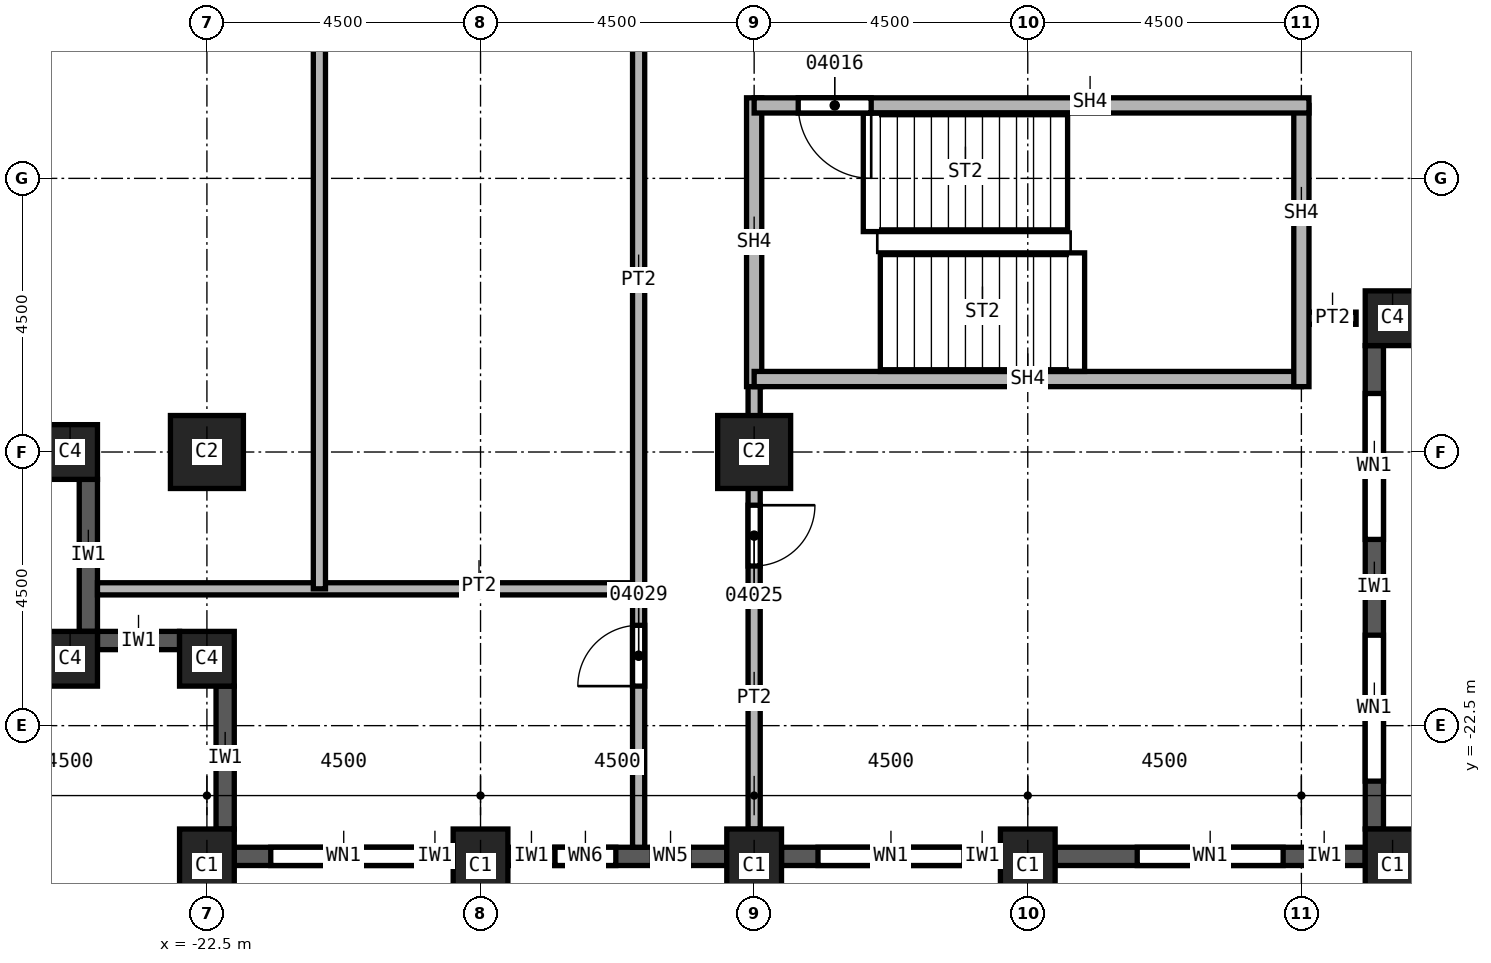
"""IFC4 building model, lengths in metres.
Left out: names, types, materials, properties, quantities, classifications, styles, units other than length and angle.
Written with IfcOpenShell. Run it as: python <this file> out.ifc"""

import sys

from ifc_helpers import new_model, si_unit, direction, frame, frame_2d, origin, origin_2d, place, context, subcontext, project, spatial, rectangle, extrude, element, fill, save


model = new_model("IFC4")
c1 = context("Model", 3, precision=1e-05, world=origin(), true_north=direction((0.0, 1.0)))
c2 = subcontext(c1, "Body", "Model", "MODEL_VIEW")
j1 = project(units=[si_unit("LENGTHUNIT", "METRE"), si_unit("PLANEANGLEUNIT", "RADIAN")], contexts=[c1])
p1 = place(None, origin())
s1 = spatial("IfcSite", under=j1, at=p1, CompositionType="ELEMENT")
p2 = place(p1, origin())
s2 = spatial("IfcBuilding", under=s1, at=p2, CompositionType="ELEMENT")
p3 = place(p2, frame((0.0, 0.0, 108.0)))
s3 = spatial("IfcBuildingStorey", under=s2, at=p3, CompositionType="ELEMENT", Elevation=108.0)
for number, where, z_axis, x_axis in (
    (1, (-13.5, -18.0, 0.0), (0.0, 0.0, 1.0), (1.0, 0.0, 0.0)),
    (2, (-22.5, -18.0, 0.0), (0.0, 0.0, 1.0), (1.0, 0.0, 0.0)),
):
    element("IfcColumn", number, at=place(p3, frame(where, z_axis=z_axis, x_axis=x_axis)), inside=s3, PredefinedType="COLUMN", context=c2, shape_type="SweptSolid", body=[
        extrude(rectangle(XDim=1.2, YDim=1.2, at=origin_2d()), origin(), (0.0, 0.0, 1.0), 3.7),
    ])
for number, where, z_axis, x_axis in (
    (3, (-3.0, -24.8, 0.0), (0.0, 0.0, 1.0), (1.0, 0.0, 0.0)),
    (4, (-9.0, -24.8, 0.0), (0.0, 0.0, 1.0), (1.0, 0.0, 0.0)),
    (5, (-13.5, -24.8, 0.0), (0.0, 0.0, 1.0), (1.0, 0.0, 0.0)),
    (6, (-18.0, -24.8, 0.0), (0.0, 0.0, 1.0), (1.0, 0.0, 0.0)),
    (7, (-22.5, -24.8, 0.0), (0.0, 0.0, 1.0), (1.0, 0.0, 0.0)),
):
    element("IfcColumn", number, at=place(p3, frame(where, z_axis=z_axis, x_axis=x_axis)), inside=s3, PredefinedType="COLUMN", context=c2, shape_type="SweptSolid", body=[
        extrude(rectangle(XDim=0.9, YDim=1.2, at=origin_2d()), origin(), (0.0, 0.0, 1.0), 3.7),
    ])
for number, where, z_axis, x_axis in (
    (8, (-3.0, -15.8, 0.0), (0.0, 0.0, 1.0), (1.0, 0.0, 0.0)),
    (9, (-22.5, -21.4, 0.0), (0.0, 0.0, 1.0), (1.0, 0.0, 0.0)),
    (10, (-24.75, -21.4, 0.0), (0.0, 0.0, 1.0), (1.0, 0.0, 0.0)),
    (11, (-24.75, -18.0, 0.0), (0.0, 0.0, 1.0), (1.0, 0.0, 0.0)),
):
    element("IfcColumn", number, at=place(p3, frame(where, z_axis=z_axis, x_axis=x_axis)), inside=s3, PredefinedType="COLUMN", context=c2, shape_type="SweptSolid", body=[
        extrude(rectangle(XDim=0.9, YDim=0.9, at=origin_2d()), origin(), (0.0, 0.0, 1.0), 3.7),
    ])
p4 = place(p3, frame((-24.45, -18.45, 0.0), z_axis=(0.0, 0.0, 1.0), x_axis=(0.0, -1.0, 0.0)))
e12 = element("IfcWall", 12, at=p4, inside=s3, PredefinedType="SOLIDWALL", context=c2, shape_type="SweptSolid", body=[
    extrude(rectangle(XDim=2.5, YDim=0.3, at=frame_2d((1.25, 0.0))), origin(), (0.0, 0.0, 1.0), 3.1),
])
p5 = place(p3, frame((-24.3, -21.1, 0.0), z_axis=(0.0, 0.0, 1.0), x_axis=(1.0, 0.0, 0.0)))
e13 = element("IfcWall", 13, at=p5, inside=s3, PredefinedType="SOLIDWALL", context=c2, shape_type="SweptSolid", body=[
    extrude(rectangle(XDim=1.35, YDim=0.3, at=frame_2d((0.675, 0.0))), origin(), (0.0, 0.0, 1.0), 3.1),
])
p6 = place(p3, frame((-22.2, -21.85, 0.0), z_axis=(0.0, 0.0, 1.0), x_axis=(0.0, -1.0, 0.0)))
e14 = element("IfcWall", 14, at=p6, inside=s3, PredefinedType="SOLIDWALL", context=c2, shape_type="SweptSolid", body=[
    extrude(rectangle(XDim=2.35, YDim=0.3, at=frame_2d((1.175, 0.0))), origin(), (0.0, 0.0, 1.0), 3.1),
])
p7 = place(p3, frame((-22.05, -24.65, 0.0), z_axis=(0.0, 0.0, 1.0), x_axis=(1.0, 0.0, 0.0)))
e15 = element("IfcWall", 15, at=p7, inside=s3, PredefinedType="SOLIDWALL", context=c2, shape_type="SweptSolid", body=[
    extrude(rectangle(XDim=3.6, YDim=0.3, at=frame_2d((1.8, 0.0))), origin(), (0.0, 0.0, 1.0), 3.1),
])
p8 = place(p7, frame((0.6, 0.0, 0.8)))
e16 = element("IfcOpeningElement", 16, at=p8, cuts=e15, PredefinedType="OPENING", context=c2, shape_type="SweptSolid", body=[
    extrude(rectangle(XDim=2.4, YDim=1.95, at=frame_2d((1.2, 0.975))), frame((0.0, 0.15, 0.0), z_axis=(0.0, -1.0, 0.0), x_axis=(1.0, 0.0, 0.0)), (0.0, 0.0, 1.0), 0.3),
])
p9 = place(p3, frame((-17.55, -24.65, 0.0), z_axis=(0.0, 0.0, 1.0), x_axis=(1.0, 0.0, 0.0)))
e17 = element("IfcWall", 17, at=p9, inside=s3, PredefinedType="SOLIDWALL", context=c2, shape_type="SweptSolid", body=[
    extrude(rectangle(XDim=3.6, YDim=0.3, at=frame_2d((1.8, 0.0))), origin(), (0.0, 0.0, 1.0), 3.1),
])
p10 = place(p9, frame((0.775, 0.0, 0.8)))
e18 = element("IfcOpeningElement", 18, at=p10, cuts=e17, PredefinedType="OPENING", context=c2, shape_type="SweptSolid", body=[
    extrude(rectangle(XDim=1.0, YDim=1.95, at=frame_2d((0.5, 0.975))), frame((0.0, 0.15, 0.0), z_axis=(0.0, -1.0, 0.0), x_axis=(1.0, 0.0, 0.0)), (0.0, 0.0, 1.0), 0.3),
])
p11 = place(p9, frame((2.375, 0.0, 0.8)))
e19 = element("IfcOpeningElement", 19, at=p11, cuts=e17, PredefinedType="OPENING", context=c2, shape_type="SweptSolid", body=[
    extrude(rectangle(XDim=0.6, YDim=1.95, at=frame_2d((0.3, 0.975))), frame((0.0, 0.15, 0.0), z_axis=(0.0, -1.0, 0.0), x_axis=(1.0, 0.0, 0.0)), (0.0, 0.0, 1.0), 0.3),
])
p12 = place(p3, frame((-13.05, -24.65, 0.0), z_axis=(0.0, 0.0, 1.0), x_axis=(1.0, 0.0, 0.0)))
e20 = element("IfcWall", 20, at=p12, inside=s3, PredefinedType="SOLIDWALL", context=c2, shape_type="SweptSolid", body=[
    extrude(rectangle(XDim=3.6, YDim=0.3, at=frame_2d((1.8, 0.0))), origin(), (0.0, 0.0, 1.0), 3.1),
])
p13 = place(p12, frame((0.6, 0.0, 0.8)))
e21 = element("IfcOpeningElement", 21, at=p13, cuts=e20, PredefinedType="OPENING", context=c2, shape_type="SweptSolid", body=[
    extrude(rectangle(XDim=2.4, YDim=1.95, at=frame_2d((1.2, 0.975))), frame((0.0, 0.15, 0.0), z_axis=(0.0, -1.0, 0.0), x_axis=(1.0, 0.0, 0.0)), (0.0, 0.0, 1.0), 0.3),
])
p14 = place(p3, frame((-8.55, -24.65, 0.0), z_axis=(0.0, 0.0, 1.0), x_axis=(1.0, 0.0, 0.0)))
e22 = element("IfcWall", 22, at=p14, inside=s3, PredefinedType="SOLIDWALL", context=c2, shape_type="SweptSolid", body=[
    extrude(rectangle(XDim=5.1, YDim=0.3, at=frame_2d((2.55, 0.0))), origin(), (0.0, 0.0, 1.0), 3.1),
])
p15 = place(p14, frame((1.35, 0.0, 0.8)))
e23 = element("IfcOpeningElement", 23, at=p15, cuts=e22, PredefinedType="OPENING", context=c2, shape_type="SweptSolid", body=[
    extrude(rectangle(XDim=2.4, YDim=1.95, at=frame_2d((1.2, 0.975))), frame((0.0, 0.15, 0.0), z_axis=(0.0, -1.0, 0.0), x_axis=(1.0, 0.0, 0.0)), (0.0, 0.0, 1.0), 0.3),
])
p16 = place(p3, frame((-3.3, -24.2, 0.0), z_axis=(0.0, 0.0, 1.0), x_axis=(0.0, 1.0, 0.0)))
e24 = element("IfcWall", 24, at=p16, inside=s3, PredefinedType="SOLIDWALL", context=c2, shape_type="SweptSolid", body=[
    extrude(rectangle(XDim=7.95, YDim=0.3, at=frame_2d((3.975, 0.0))), origin(), (0.0, 0.0, 1.0), 3.1),
])
p17 = place(p16, frame((0.788, 0.0, 0.8)))
e25 = element("IfcOpeningElement", 25, at=p17, cuts=e24, PredefinedType="OPENING", context=c2, shape_type="SweptSolid", body=[
    extrude(rectangle(XDim=2.4, YDim=1.95, at=frame_2d((1.2, 0.975))), frame((0.0, 0.15, 0.0), z_axis=(0.0, -1.0, 0.0), x_axis=(1.0, 0.0, 0.0)), (0.0, 0.0, 1.0), 0.3),
])
p18 = place(p16, frame((4.762, 0.0, 0.8)))
e26 = element("IfcOpeningElement", 26, at=p18, cuts=e24, PredefinedType="OPENING", context=c2, shape_type="SweptSolid", body=[
    extrude(rectangle(XDim=2.4, YDim=1.95, at=frame_2d((1.2, 0.975))), frame((0.0, 0.15, 0.0), z_axis=(0.0, -1.0, 0.0), x_axis=(1.0, 0.0, 0.0)), (0.0, 0.0, 1.0), 0.3),
])
p19 = place(p3, frame((-24.3, -20.25, 0.0), z_axis=(0.0, 0.0, 1.0), x_axis=(1.0, 0.0, 0.0)))
e27 = element("IfcWall", 27, at=p19, inside=s3, PredefinedType="PARTITIONING", context=c2, shape_type="SweptSolid", body=[
    extrude(rectangle(XDim=8.9, YDim=0.2, at=frame_2d((4.45, 0.0))), origin(), (0.0, 0.0, 1.0), 3.7),
])
p20 = place(p3, frame((-20.65, -20.25, 0.0), z_axis=(0.0, 0.0, 1.0), x_axis=(0.0, 1.0, 0.0)))
e28 = element("IfcWall", 28, at=p20, inside=s3, PredefinedType="PARTITIONING", context=c2, shape_type="SweptSolid", body=[
    extrude(rectangle(XDim=21.0, YDim=0.2, at=frame_2d((10.5, 0.0))), origin(), (0.0, 0.0, 1.0), 3.7),
])
p21 = place(p20, frame((9.1, 0.0, 0.0)))
e29 = element("IfcOpeningElement", 29, at=p21, cuts=e28, PredefinedType="OPENING", context=c2, shape_type="SweptSolid", body=[
    extrude(rectangle(XDim=1.0, YDim=2.1, at=frame_2d((0.5, 1.05))), frame((0.0, 0.1, 0.0), z_axis=(0.0, -1.0, 0.0), x_axis=(1.0, 0.0, 0.0)), (0.0, 0.0, 1.0), 0.2),
])
p22 = place(p3, frame((-15.4, -24.5, 0.0), z_axis=(0.0, 0.0, 1.0), x_axis=(0.0, 1.0, 0.0)))
e30 = element("IfcWall", 30, at=p22, inside=s3, PredefinedType="PARTITIONING", context=c2, shape_type="SweptSolid", body=[
    extrude(rectangle(XDim=25.35, YDim=0.2, at=frame_2d((12.675, 0.0))), origin(), (0.0, 0.0, 1.0), 3.7),
])
p23 = place(p22, frame((2.65, 0.0, 0.0)))
e31 = element("IfcOpeningElement", 31, at=p23, cuts=e30, PredefinedType="OPENING", context=c2, shape_type="SweptSolid", body=[
    extrude(rectangle(XDim=1.0, YDim=2.1, at=frame_2d((0.5, 1.05))), frame((0.0, 0.1, 0.0), z_axis=(0.0, -1.0, 0.0), x_axis=(1.0, 0.0, 0.0)), (0.0, 0.0, 1.0), 0.2),
])
p24 = place(p22, frame((14.3, 0.0, 0.0)))
e32 = element("IfcOpeningElement", 32, at=p24, cuts=e30, PredefinedType="OPENING", context=c2, shape_type="SweptSolid", body=[
    extrude(rectangle(XDim=1.0, YDim=2.1, at=frame_2d((0.5, 1.05))), frame((0.0, 0.1, 0.0), z_axis=(0.0, -1.0, 0.0), x_axis=(1.0, 0.0, 0.0)), (0.0, 0.0, 1.0), 0.2),
])
p25 = place(p3, frame((-13.5, -16.675, 0.0), z_axis=(0.0, 0.0, 1.0), x_axis=(0.0, -1.0, 0.0)))
e33 = element("IfcWall", 33, at=p25, inside=s3, PredefinedType="PARTITIONING", context=c2, shape_type="SweptSolid", body=[
    extrude(rectangle(XDim=7.525, YDim=0.2, at=frame_2d((3.762, 0.0))), origin(), (0.0, 0.0, 1.0), 3.7),
])
p26 = place(p25, frame((2.2, 0.0, 0.0)))
e34 = element("IfcOpeningElement", 34, at=p26, cuts=e33, PredefinedType="OPENING", context=c2, shape_type="SweptSolid", body=[
    extrude(rectangle(XDim=1.0, YDim=2.1, at=frame_2d((0.5, 1.05))), frame((0.0, 0.1, 0.0), z_axis=(0.0, -1.0, 0.0), x_axis=(1.0, 0.0, 0.0)), (0.0, 0.0, 1.0), 0.2),
])
p27 = place(p3, frame((-3.6, -15.8, 0.0), z_axis=(0.0, 0.0, 1.0), x_axis=(-1.0, 0.0, 0.0)))
e35 = element("IfcWall", 35, at=p27, inside=s3, PredefinedType="PARTITIONING", context=c2, shape_type="SweptSolid", body=[
    extrude(rectangle(XDim=0.9, YDim=0.2, at=frame_2d((0.45, 0.0))), origin(), (0.0, 0.0, 1.0), 3.7),
])
p28 = place(p3, frame((-13.5, -12.175, 0.0), z_axis=(0.0, 0.0, 1.0), x_axis=(0.0, -1.0, 0.0)))
e36 = element("IfcWall", 36, at=p28, inside=s3, PredefinedType="SOLIDWALL", context=c2, shape_type="SweptSolid", body=[
    extrude(rectangle(XDim=4.75, YDim=0.25, at=frame_2d((2.375, 0.0))), origin(), (0.0, 0.0, 1.0), 3.7),
])
p29 = place(p3, frame((-4.5, -16.8, 0.0), z_axis=(0.0, 0.0, 1.0), x_axis=(-1.0, 0.0, 0.0)))
e37 = element("IfcWall", 37, at=p29, inside=s3, PredefinedType="SOLIDWALL", context=c2, shape_type="SweptSolid", body=[
    extrude(rectangle(XDim=9.0, YDim=0.25, at=frame_2d((4.5, 0.0))), origin(), (0.0, 0.0, 1.0), 3.7),
])
p30 = place(p3, frame((-4.5, -12.3, 0.0), z_axis=(0.0, 0.0, 1.0), x_axis=(0.0, -1.0, 0.0)))
e38 = element("IfcWall", 38, at=p30, inside=s3, PredefinedType="SOLIDWALL", context=c2, shape_type="SweptSolid", body=[
    extrude(rectangle(XDim=4.625, YDim=0.25, at=frame_2d((2.312, 0.0))), origin(), (0.0, 0.0, 1.0), 3.7),
])
p31 = place(p3, frame((-4.375, -12.3, 0.0), z_axis=(0.0, 0.0, 1.0), x_axis=(-1.0, 0.0, 0.0)))
e39 = element("IfcWall", 39, at=p31, inside=s3, PredefinedType="SOLIDWALL", context=c2, shape_type="SweptSolid", body=[
    extrude(rectangle(XDim=9.125, YDim=0.25, at=frame_2d((4.562, 0.0))), origin(), (0.0, 0.0, 1.0), 3.7),
])
p32 = place(p31, frame((7.2, 0.0, 0.0)))
e40 = element("IfcOpeningElement", 40, at=p32, cuts=e39, PredefinedType="OPENING", context=c2, shape_type="SweptSolid", body=[
    extrude(rectangle(XDim=1.2, YDim=2.1, at=frame_2d((0.6, 1.05))), frame((0.0, 0.125, 0.0), z_axis=(0.0, -1.0, 0.0), x_axis=(1.0, 0.0, 0.0)), (0.0, 0.0, 1.0), 0.25),
])
p33 = place(p8, origin())
e41 = element("IfcWindow", 41, at=p33, inside=s3, PartitioningType="SINGLE_PANEL", PredefinedType="WINDOW", context=c2, shape_type="SweptSolid", body=[
    extrude(rectangle(XDim=2.4, YDim=1.95, at=frame_2d((1.2, 0.975))), frame((0.0, 0.03, 0.0), z_axis=(0.0, -1.0, 0.0), x_axis=(1.0, 0.0, 0.0)), (0.0, 0.0, 1.0), 0.06),
])
fill(e16, e41)
p34 = place(p13, origin())
e42 = element("IfcWindow", 42, at=p34, inside=s3, PartitioningType="SINGLE_PANEL", PredefinedType="WINDOW", context=c2, shape_type="SweptSolid", body=[
    extrude(rectangle(XDim=2.4, YDim=1.95, at=frame_2d((1.2, 0.975))), frame((0.0, 0.03, 0.0), z_axis=(0.0, -1.0, 0.0), x_axis=(1.0, 0.0, 0.0)), (0.0, 0.0, 1.0), 0.06),
])
fill(e21, e42)
p35 = place(p15, origin())
e43 = element("IfcWindow", 43, at=p35, inside=s3, PartitioningType="SINGLE_PANEL", PredefinedType="WINDOW", context=c2, shape_type="SweptSolid", body=[
    extrude(rectangle(XDim=2.4, YDim=1.95, at=frame_2d((1.2, 0.975))), frame((0.0, 0.03, 0.0), z_axis=(0.0, -1.0, 0.0), x_axis=(1.0, 0.0, 0.0)), (0.0, 0.0, 1.0), 0.06),
])
fill(e23, e43)
p36 = place(p17, origin())
e44 = element("IfcWindow", 44, at=p36, inside=s3, PartitioningType="SINGLE_PANEL", PredefinedType="WINDOW", context=c2, shape_type="SweptSolid", body=[
    extrude(rectangle(XDim=2.4, YDim=1.95, at=frame_2d((1.2, 0.975))), frame((0.0, 0.03, 0.0), z_axis=(0.0, -1.0, 0.0), x_axis=(1.0, 0.0, 0.0)), (0.0, 0.0, 1.0), 0.06),
])
fill(e25, e44)
p37 = place(p18, origin())
e45 = element("IfcWindow", 45, at=p37, inside=s3, PartitioningType="SINGLE_PANEL", PredefinedType="WINDOW", context=c2, shape_type="SweptSolid", body=[
    extrude(rectangle(XDim=2.4, YDim=1.95, at=frame_2d((1.2, 0.975))), frame((0.0, 0.03, 0.0), z_axis=(0.0, -1.0, 0.0), x_axis=(1.0, 0.0, 0.0)), (0.0, 0.0, 1.0), 0.06),
])
fill(e26, e45)
p38 = place(p32, origin())
e46 = element("IfcDoor", 46, at=p38, inside=s3, OperationType="SINGLE_SWING_LEFT", PredefinedType="DOOR", context=c2, shape_type="SweptSolid", body=[
    extrude(rectangle(XDim=1.2, YDim=2.1, at=frame_2d((0.6, 1.05))), frame((0.0, 0.025, 0.0), z_axis=(0.0, -1.0, 0.0), x_axis=(1.0, 0.0, 0.0)), (0.0, 0.0, 1.0), 0.05),
])
fill(e40, e46)
p39 = place(p26, origin())
e47 = element("IfcDoor", 47, at=p39, inside=s3, OperationType="SINGLE_SWING_RIGHT", PredefinedType="DOOR", context=c2, shape_type="SweptSolid", body=[
    extrude(rectangle(XDim=1.0, YDim=2.1, at=frame_2d((0.5, 1.05))), frame((0.0, 0.025, 0.0), z_axis=(0.0, -1.0, 0.0), x_axis=(1.0, 0.0, 0.0)), (0.0, 0.0, 1.0), 0.05),
])
fill(e34, e47)
p40 = place(p23, origin())
e48 = element("IfcDoor", 48, at=p40, inside=s3, OperationType="SINGLE_SWING_RIGHT", PredefinedType="DOOR", context=c2, shape_type="SweptSolid", body=[
    extrude(rectangle(XDim=1.0, YDim=2.1, at=frame_2d((0.5, 1.05))), frame((0.0, 0.025, 0.0), z_axis=(0.0, -1.0, 0.0), x_axis=(1.0, 0.0, 0.0)), (0.0, 0.0, 1.0), 0.05),
])
fill(e31, e48)
p41 = place(p10, origin())
e49 = element("IfcWindow", 49, at=p41, inside=s3, PartitioningType="SINGLE_PANEL", PredefinedType="WINDOW", context=c2, shape_type="SweptSolid", body=[
    extrude(rectangle(XDim=1.0, YDim=1.95, at=frame_2d((0.5, 0.975))), frame((0.0, 0.03, 0.0), z_axis=(0.0, -1.0, 0.0), x_axis=(1.0, 0.0, 0.0)), (0.0, 0.0, 1.0), 0.06),
])
fill(e18, e49)
p42 = place(p11, origin())
e50 = element("IfcWindow", 50, at=p42, inside=s3, PartitioningType="SINGLE_PANEL", PredefinedType="WINDOW", context=c2, shape_type="SweptSolid", body=[
    extrude(rectangle(XDim=0.6, YDim=1.95, at=frame_2d((0.3, 0.975))), frame((0.0, 0.03, 0.0), z_axis=(0.0, -1.0, 0.0), x_axis=(1.0, 0.0, 0.0)), (0.0, 0.0, 1.0), 0.06),
])
fill(e19, e50)
save(model, sys.argv[1])
